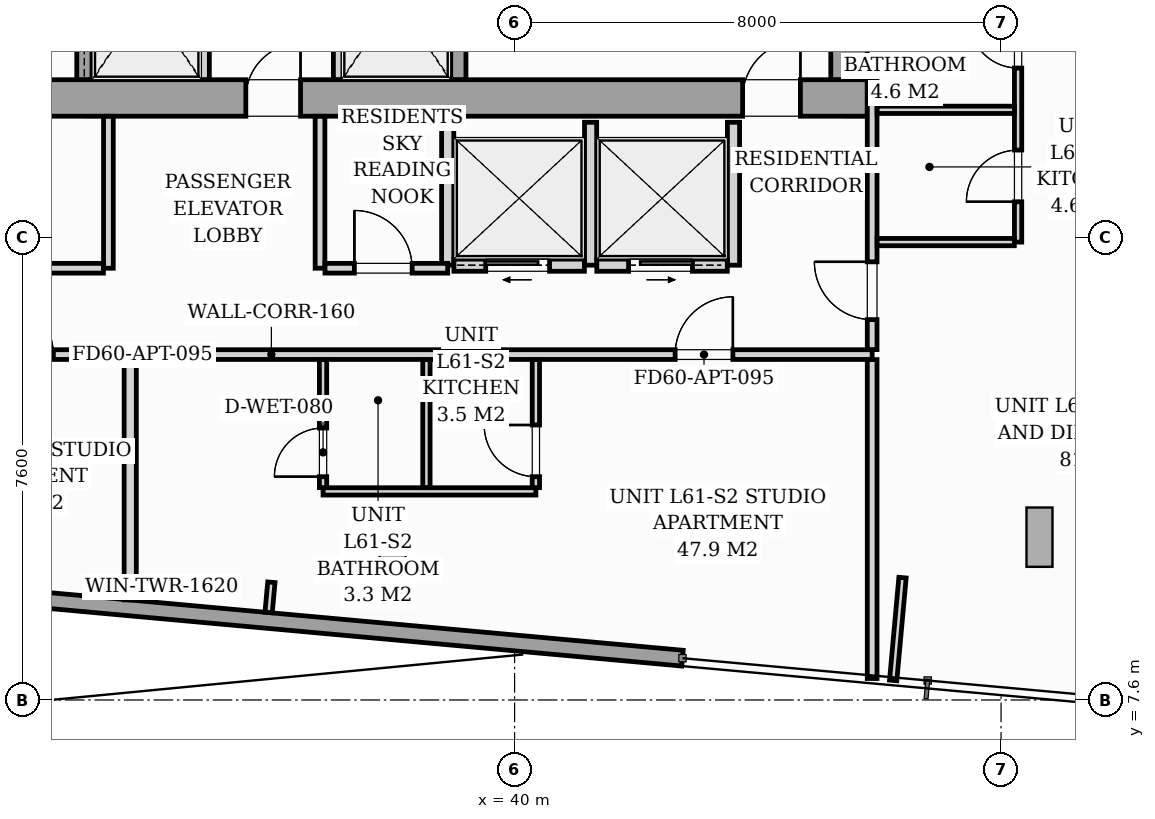
"""IFC4 building model, lengths in metres.
Left out: names, types, materials, properties, quantities, classifications, styles, units other than length and angle.
Written with IfcOpenShell. Run it as: python <this file> out.ifc"""

import sys

from ifc_helpers import new_model, si_unit, direction, frame, frame_2d, origin, origin_2d, place, context, subcontext, project, spatial, rectangle, i_section, extrude, source, transform, mapped, element, fill, save


model = new_model("IFC4")
c1 = context("Model", 3, precision=1e-05, world=origin(), true_north=direction((0.0, 1.0)))
c2 = subcontext(c1, "Body", "Model", "MODEL_VIEW")
j1 = project(units=[si_unit("LENGTHUNIT", "METRE"), si_unit("PLANEANGLEUNIT", "RADIAN")], contexts=[c1])
p1 = place(None, origin())
s1 = spatial("IfcSite", under=j1, at=p1, CompositionType="ELEMENT")
p2 = place(p1, origin())
s2 = spatial("IfcBuilding", under=s1, at=p2, CompositionType="ELEMENT")
p3 = place(p2, frame((0.0, 0.0, 211.4)))
s3 = spatial("IfcBuildingStorey", under=s2, at=p3, CompositionType="ELEMENT", Elevation=211.4)
m1 = source(origin(), c2, "Body", "SweptSolid", [
    extrude(i_section(OverallWidth=0.409, OverallDepth=0.425, WebThickness=0.033, FlangeThickness=0.052, FilletRadius=0.018, at=origin_2d()), origin(), (0.0, 0.0, 1.0), 5.196),
])
for number, where, z_axis, x_axis in (
    (1, (33.12, 17.4, 0.002), (0.0, 0.0, 1.0), (1.0, 0.0, 0.0)),
    (2, (38.88, 17.4, 0.002), (0.0, 0.0, 1.0), (1.0, 0.0, 0.0)),
    (3, (45.6, 17.4, 0.002), (0.0, 0.0, 1.0), (1.0, 0.0, 0.0)),
):
    element("IfcColumn", number, at=place(p3, frame(where, z_axis=z_axis, x_axis=x_axis)), inside=s3, PredefinedType="PILASTER", context=c2, shape_type="MappedRepresentation", body=[
        mapped(m1, transform((0.0, 0.0, 0.0), scale=1.0)),
    ])
m2 = source(origin(), c2, "Body", "SweptSolid", [
    extrude(i_section(OverallWidth=0.427, OverallDepth=0.976, WebThickness=0.031, FlangeThickness=0.056, FilletRadius=0.024, at=origin_2d()), origin(), (0.0, 0.0, 1.0), 8.487),
])
p4 = place(p3, frame((39.648, 9.549, 0.195), z_axis=(-0.85149277394, 0.086009371105, 0.51726438502), x_axis=(0.514645573214, -0.051984401335, 0.855825657473)))
e4 = element("IfcColumn", 4, at=p4, inside=s3, PredefinedType="COLUMN", context=c2, shape_type="MappedRepresentation", body=[
    mapped(m2, transform((0.0, 0.0, 0.0), scale=1.0)),
])
m3 = source(origin(), c2, "Body", "SweptSolid", [
    extrude(i_section(OverallWidth=0.427, OverallDepth=0.976, WebThickness=0.031, FlangeThickness=0.056, FilletRadius=0.024, at=origin_2d()), origin(), (0.0, 0.0, 1.0), 9.321),
])
p5 = place(p3, frame((50.494, 10.518, 0.201), z_axis=(-0.87551198847, -0.113200790205, 0.46974923006), x_axis=(0.465871238968, 0.060235602801, 0.882799898538)))
e5 = element("IfcColumn", 5, at=p5, inside=s3, PredefinedType="COLUMN", context=c2, shape_type="MappedRepresentation", body=[
    mapped(m3, transform((0.0, 0.0, 0.0), scale=1.0)),
])
p6 = place(p3, frame((42.761, 8.287, 0.0), z_axis=(0.0, 0.0, 1.0), x_axis=(-0.995884956798, 0.090626446601, 0.0)))
e6 = element("IfcWall", 6, at=p6, inside=s3, PredefinedType="STANDARD", context=c2, shape_type="SweptSolid", body=[
    extrude(rectangle(XDim=21.6, YDim=0.26, at=frame_2d((10.8, 0.0))), origin(), (0.0, 0.0, 1.0), 4.78),
])
p7 = place(p6, frame((12.194, 0.0, 0.75)))
e7 = element("IfcOpeningElement", 7, at=p7, cuts=e6, PredefinedType="OPENING", context=c2, shape_type="SweptSolid", body=[
    extrude(rectangle(XDim=1.6, YDim=1.5, at=frame_2d((0.8, 0.75))), frame((0.0, 0.14, 0.0), z_axis=(0.0, -1.0, 0.0), x_axis=(1.0, 0.0, 0.0)), (0.0, 0.0, 1.0), 0.28),
])
p8 = place(p3, frame((26.2, 17.5, 0.0), z_axis=(0.0, 0.0, 1.0), x_axis=(1.0, 0.0, 0.0)))
e8 = element("IfcWall", 8, at=p8, inside=s3, PredefinedType="SHEAR", context=c2, shape_type="SweptSolid", body=[
    extrude(rectangle(XDim=19.6, YDim=0.6, at=frame_2d((9.8, 0.0))), origin(), (0.0, 0.0, 1.0), 5.2),
])
p9 = place(p8, frame((0.95, 0.0, 0.0)))
e9 = element("IfcOpeningElement", 9, at=p9, cuts=e8, PredefinedType="OPENING", context=c2, shape_type="SweptSolid", body=[
    extrude(rectangle(XDim=0.95, YDim=2.06, at=frame_2d((0.475, 1.03))), frame((0.0, 0.31, 0.0), z_axis=(0.0, -1.0, 0.0), x_axis=(1.0, 0.0, 0.0)), (0.0, 0.0, 1.0), 0.62),
])
p10 = place(p8, frame((9.38, 0.0, 0.0)))
e10 = element("IfcOpeningElement", 10, at=p10, cuts=e8, PredefinedType="OPENING", context=c2, shape_type="SweptSolid", body=[
    extrude(rectangle(XDim=0.9, YDim=2.06, at=frame_2d((0.45, 1.03))), frame((0.0, 0.31, 0.0), z_axis=(0.0, -1.0, 0.0), x_axis=(1.0, 0.0, 0.0)), (0.0, 0.0, 1.0), 0.62),
])
p11 = place(p8, frame((17.55, 0.0, 0.0)))
e11 = element("IfcOpeningElement", 11, at=p11, cuts=e8, PredefinedType="OPENING", context=c2, shape_type="SweptSolid", body=[
    extrude(rectangle(XDim=0.95, YDim=2.06, at=frame_2d((0.475, 1.03))), frame((0.0, 0.31, 0.0), z_axis=(0.0, -1.0, 0.0), x_axis=(1.0, 0.0, 0.0)), (0.0, 0.0, 1.0), 0.62),
])
p12 = place(p3, frame((45.5, 17.802, 0.0), z_axis=(0.0, 0.0, 1.0), x_axis=(0.0, 1.0, 0.0)))
e12 = element("IfcWall", 12, at=p12, inside=s3, PredefinedType="SHEAR", context=c2, shape_type="SweptSolid", body=[
    extrude(rectangle(XDim=5.796, YDim=0.6, at=frame_2d((2.898, 0.0))), origin(), (0.0, 0.0, 1.0), 5.2),
])
p13 = place(p3, frame((32.925, 17.802, 0.0), z_axis=(0.0, 0.0, 1.0), x_axis=(0.0, 1.0, 0.0)))
e13 = element("IfcWall", 13, at=p13, inside=s3, PredefinedType="SOLIDWALL", context=c2, shape_type="SweptSolid", body=[
    extrude(rectangle(XDim=2.646, YDim=0.25, at=frame_2d((1.323, 0.0))), origin(), (0.0, 0.0, 1.0), 5.2),
])
p14 = place(p13, frame((0.548, 0.0, 0.0)))
e14 = element("IfcOpeningElement", 14, at=p14, cuts=e13, PredefinedType="OPENING", context=c2, shape_type="SweptSolid", body=[
    extrude(rectangle(XDim=1.1, YDim=2.08, at=frame_2d((0.55, 1.04))), frame((0.0, 0.135, 0.0), z_axis=(0.0, -1.0, 0.0), x_axis=(1.0, 0.0, 0.0)), (0.0, 0.0, 1.0), 0.27),
])
for number, where, z_axis, x_axis in (
    (15, (34.9, 17.802, 0.0), (0.0, 0.0, 1.0), (0.0, 1.0, 0.0)),
    (16, (37.1, 17.802, 0.0), (0.0, 0.0, 1.0), (0.0, 1.0, 0.0)),
):
    element("IfcWall", number, at=place(p3, frame(where, z_axis=z_axis, x_axis=x_axis)), inside=s3, PredefinedType="PARTITIONING", context=c2, shape_type="SweptSolid", body=[
        extrude(rectangle(XDim=2.646, YDim=0.16, at=frame_2d((1.323, 0.0))), origin(), (0.0, 0.0, 1.0), 4.78),
    ])
p15 = place(p3, frame((39.075, 17.802, 0.0), z_axis=(0.0, 0.0, 1.0), x_axis=(0.0, 1.0, 0.0)))
e17 = element("IfcWall", 17, at=p15, inside=s3, PredefinedType="SOLIDWALL", context=c2, shape_type="SweptSolid", body=[
    extrude(rectangle(XDim=2.646, YDim=0.25, at=frame_2d((1.323, 0.0))), origin(), (0.0, 0.0, 1.0), 5.2),
])
p16 = place(p15, frame((0.548, 0.0, 0.0)))
e18 = element("IfcOpeningElement", 18, at=p16, cuts=e17, PredefinedType="OPENING", context=c2, shape_type="SweptSolid", body=[
    extrude(rectangle(XDim=1.1, YDim=2.08, at=frame_2d((0.55, 1.04))), frame((0.0, 0.135, 0.0), z_axis=(0.0, -1.0, 0.0), x_axis=(1.0, 0.0, 0.0)), (0.0, 0.0, 1.0), 0.27),
])
for number, where, z_axis, x_axis in (
    (19, (38.9, 14.75, 0.0), (0.0, 0.0, 1.0), (0.0, 1.0, 0.0)),
    (20, (41.25, 14.75, 0.0), (0.0, 0.0, 1.0), (0.0, 1.0, 0.0)),
    (21, (43.6, 14.75, 0.0), (0.0, 0.0, 1.0), (0.0, 1.0, 0.0)),
):
    element("IfcWall", number, at=place(p3, frame(where, z_axis=z_axis, x_axis=x_axis)), inside=s3, PredefinedType="PARTITIONING", context=c2, shape_type="SweptSolid", body=[
        extrude(rectangle(XDim=2.35, YDim=0.2, at=frame_2d((1.175, 0.0))), origin(), (0.0, 0.0, 1.0), 4.78),
    ])
p17 = place(p3, frame((39.002, 14.75, 0.0), z_axis=(0.0, 0.0, 1.0), x_axis=(1.0, 0.0, 0.0)))
e22 = element("IfcWall", 22, at=p17, inside=s3, PredefinedType="PARTITIONING", context=c2, shape_type="SweptSolid", body=[
    extrude(rectangle(XDim=2.146, YDim=0.2, at=frame_2d((1.073, 0.0))), origin(), (0.0, 0.0, 1.0), 4.78),
])
p18 = place(p17, frame((0.523, 0.0, 0.0)))
e23 = element("IfcOpeningElement", 23, at=p18, cuts=e22, PredefinedType="OPENING", context=c2, shape_type="SweptSolid", body=[
    extrude(rectangle(XDim=1.05, YDim=2.08, at=frame_2d((0.525, 1.04))), frame((0.0, 0.11, 0.0), z_axis=(0.0, -1.0, 0.0), x_axis=(1.0, 0.0, 0.0)), (0.0, 0.0, 1.0), 0.22),
])
p19 = place(p3, frame((41.352, 14.75, 0.0), z_axis=(0.0, 0.0, 1.0), x_axis=(1.0, 0.0, 0.0)))
e24 = element("IfcWall", 24, at=p19, inside=s3, PredefinedType="PARTITIONING", context=c2, shape_type="SweptSolid", body=[
    extrude(rectangle(XDim=2.146, YDim=0.2, at=frame_2d((1.073, 0.0))), origin(), (0.0, 0.0, 1.0), 4.78),
])
p20 = place(p19, frame((0.523, 0.0, 0.0)))
e25 = element("IfcOpeningElement", 25, at=p20, cuts=e24, PredefinedType="OPENING", context=c2, shape_type="SweptSolid", body=[
    extrude(rectangle(XDim=1.05, YDim=2.08, at=frame_2d((0.525, 1.04))), frame((0.0, 0.11, 0.0), z_axis=(0.0, -1.0, 0.0), x_axis=(1.0, 0.0, 0.0)), (0.0, 0.0, 1.0), 0.22),
])
p21 = place(p3, frame((26.12, 13.28, 0.0), z_axis=(0.0, 0.0, 1.0), x_axis=(1.0, 0.0, 0.0)))
e26 = element("IfcWall", 26, at=p21, inside=s3, PredefinedType="PARTITIONING", context=c2, shape_type="SweptSolid", body=[
    extrude(rectangle(XDim=19.76, YDim=0.16, at=frame_2d((9.88, 0.0))), origin(), (0.0, 0.0, 1.0), 4.345),
])
p22 = place(p21, frame((5.345, 0.0, 0.0)))
e27 = element("IfcOpeningElement", 27, at=p22, cuts=e26, PredefinedType="OPENING", context=c2, shape_type="SweptSolid", body=[
    extrude(rectangle(XDim=0.95, YDim=2.06, at=frame_2d((0.475, 1.03))), frame((0.0, 0.09, 0.0), z_axis=(0.0, -1.0, 0.0), x_axis=(1.0, 0.0, 0.0)), (0.0, 0.0, 1.0), 0.18),
])
p23 = place(p21, frame((16.52, 0.0, 0.0)))
e28 = element("IfcOpeningElement", 28, at=p23, cuts=e26, PredefinedType="OPENING", context=c2, shape_type="SweptSolid", body=[
    extrude(rectangle(XDim=0.95, YDim=2.06, at=frame_2d((0.475, 1.03))), frame((0.0, 0.09, 0.0), z_axis=(0.0, -1.0, 0.0), x_axis=(1.0, 0.0, 0.0)), (0.0, 0.0, 1.0), 0.18),
])
p24 = place(p3, frame((45.88, 7.953, 0.0), z_axis=(0.0, 0.0, 1.0), x_axis=(0.0, 1.0, 0.0)))
e29 = element("IfcWall", 29, at=p24, inside=s3, PredefinedType="PARTITIONING", context=c2, shape_type="SweptSolid", body=[
    extrude(rectangle(XDim=5.245, YDim=0.16, at=frame_2d((2.623, 0.0))), origin(), (0.0, 0.0, 1.0), 4.78),
])
p25 = place(p3, frame((45.88, 13.362, 0.0), z_axis=(0.0, 0.0, 1.0), x_axis=(0.0, 1.0, 0.0)))
e30 = element("IfcWall", 30, at=p25, inside=s3, PredefinedType="PARTITIONING", context=c2, shape_type="SweptSolid", body=[
    extrude(rectangle(XDim=4.44, YDim=0.16, at=frame_2d((2.22, 0.0))), origin(), (0.0, 0.0, 1.0), 4.78),
])
p26 = place(p25, frame((0.493, 0.0, 0.0)))
e31 = element("IfcOpeningElement", 31, at=p26, cuts=e30, PredefinedType="OPENING", context=c2, shape_type="SweptSolid", body=[
    extrude(rectangle(XDim=0.95, YDim=2.06, at=frame_2d((0.475, 1.03))), frame((0.0, 0.09, 0.0), z_axis=(0.0, -1.0, 0.0), x_axis=(1.0, 0.0, 0.0)), (0.0, 0.0, 1.0), 0.18),
])
p27 = place(p3, frame((33.679, 9.246, 0.0), z_axis=(0.0, 0.0, 1.0), x_axis=(0.0, 1.0, 0.0)))
e32 = element("IfcWall", 32, at=p27, inside=s3, PredefinedType="PARTITIONING", context=c2, shape_type="SweptSolid", body=[
    extrude(rectangle(XDim=3.952, YDim=0.2, at=frame_2d((1.976, 0.0))), origin(), (0.0, 0.0, 1.0), 4.78),
])
p28 = place(p3, frame((36.85, 11.03, 0.0), z_axis=(0.0, 0.0, 1.0), x_axis=(1.0, 0.0, 0.0)))
e33 = element("IfcWall", 33, at=p28, inside=s3, PredefinedType="PARTITIONING", context=c2, shape_type="SweptSolid", body=[
    extrude(rectangle(XDim=3.5, YDim=0.12, at=frame_2d((1.75, 0.0))), origin(), (0.0, 0.0, 1.0), 4.78),
])
p29 = place(p3, frame((36.85, 11.092, 0.0), z_axis=(0.0, 0.0, 1.0), x_axis=(0.0, 1.0, 0.0)))
e34 = element("IfcWall", 34, at=p29, inside=s3, PredefinedType="PARTITIONING", context=c2, shape_type="SweptSolid", body=[
    extrude(rectangle(XDim=2.106, YDim=0.12, at=frame_2d((1.053, 0.0))), origin(), (0.0, 0.0, 1.0), 4.78),
])
p30 = place(p29, frame((0.18, 0.0, 0.0)))
e35 = element("IfcOpeningElement", 35, at=p30, cuts=e34, PredefinedType="OPENING", context=c2, shape_type="SweptSolid", body=[
    extrude(rectangle(XDim=0.8, YDim=2.02, at=frame_2d((0.4, 1.01))), frame((0.0, 0.07, 0.0), z_axis=(0.0, -1.0, 0.0), x_axis=(1.0, 0.0, 0.0)), (0.0, 0.0, 1.0), 0.14),
])
p31 = place(p3, frame((38.55, 11.092, 0.0), z_axis=(0.0, 0.0, 1.0), x_axis=(0.0, 1.0, 0.0)))
e36 = element("IfcWall", 36, at=p31, inside=s3, PredefinedType="PARTITIONING", context=c2, shape_type="SweptSolid", body=[
    extrude(rectangle(XDim=2.106, YDim=0.12, at=frame_2d((1.053, 0.0))), origin(), (0.0, 0.0, 1.0), 4.78),
])
p32 = place(p3, frame((40.35, 11.092, 0.0), z_axis=(0.0, 0.0, 1.0), x_axis=(0.0, 1.0, 0.0)))
e37 = element("IfcWall", 37, at=p32, inside=s3, PredefinedType="PARTITIONING", context=c2, shape_type="SweptSolid", body=[
    extrude(rectangle(XDim=2.106, YDim=0.12, at=frame_2d((1.053, 0.0))), origin(), (0.0, 0.0, 1.0), 4.78),
])
p33 = place(p32, frame((0.18, 0.0, 0.0)))
e38 = element("IfcOpeningElement", 38, at=p33, cuts=e37, PredefinedType="OPENING", context=c2, shape_type="SweptSolid", body=[
    extrude(rectangle(XDim=0.85, YDim=2.05, at=frame_2d((0.425, 1.025))), frame((0.0, 0.07, 0.0), z_axis=(0.0, -1.0, 0.0), x_axis=(1.0, 0.0, 0.0)), (0.0, 0.0, 1.0), 0.14),
])
p34 = place(p3, frame((48.28, 15.13, 0.0), z_axis=(0.0, 0.0, 1.0), x_axis=(0.0, 1.0, 0.0)))
e39 = element("IfcWall", 39, at=p34, inside=s3, PredefinedType="PARTITIONING", context=c2, shape_type="SweptSolid", body=[
    extrude(rectangle(XDim=4.35, YDim=0.12, at=frame_2d((2.175, 0.0))), origin(), (0.0, 0.0, 1.0), 4.78),
])
p35 = place(p34, frame((0.663, 0.0, 0.0)))
e40 = element("IfcOpeningElement", 40, at=p35, cuts=e39, PredefinedType="OPENING", context=c2, shape_type="SweptSolid", body=[
    extrude(rectangle(XDim=0.85, YDim=2.05, at=frame_2d((0.425, 1.025))), frame((0.0, 0.07, 0.0), z_axis=(0.0, -1.0, 0.0), x_axis=(1.0, 0.0, 0.0)), (0.0, 0.0, 1.0), 0.14),
])
p36 = place(p34, frame((2.862, 0.0, 0.0)))
e41 = element("IfcOpeningElement", 41, at=p36, cuts=e39, PredefinedType="OPENING", context=c2, shape_type="SweptSolid", body=[
    extrude(rectangle(XDim=0.8, YDim=2.02, at=frame_2d((0.4, 1.01))), frame((0.0, 0.07, 0.0), z_axis=(0.0, -1.0, 0.0), x_axis=(1.0, 0.0, 0.0)), (0.0, 0.0, 1.0), 0.14),
])
p37 = place(p3, frame((45.962, 17.305, 0.0), z_axis=(0.0, 0.0, 1.0), x_axis=(1.0, 0.0, 0.0)))
e42 = element("IfcWall", 42, at=p37, inside=s3, PredefinedType="PARTITIONING", context=c2, shape_type="SweptSolid", body=[
    extrude(rectangle(XDim=2.256, YDim=0.12, at=frame_2d((1.128, 0.0))), origin(), (0.0, 0.0, 1.0), 4.122),
])
p38 = place(p3, frame((45.962, 15.13, 0.0), z_axis=(0.0, 0.0, 1.0), x_axis=(1.0, 0.0, 0.0)))
e43 = element("IfcWall", 43, at=p38, inside=s3, PredefinedType="PARTITIONING", context=c2, shape_type="SweptSolid", body=[
    extrude(rectangle(XDim=2.256, YDim=0.12, at=frame_2d((1.128, 0.0))), origin(), (0.0, 0.0, 1.0), 4.78),
])
p39 = place(p3, frame((33.32, 14.7, 0.0), z_axis=(0.0, 0.0, 1.0), x_axis=(0.0, 1.0, 0.0)))
e44 = element("IfcWall", 44, at=p39, inside=s3, PredefinedType="PARTITIONING", context=c2, shape_type="SweptSolid", body=[
    extrude(rectangle(XDim=2.498, YDim=0.16, at=frame_2d((1.249, 0.0))), origin(), (0.0, 0.0, 1.0), 4.78),
])
p40 = place(p3, frame((28.442, 14.7, 0.0), z_axis=(0.0, 0.0, 1.0), x_axis=(1.0, 0.0, 0.0)))
e45 = element("IfcWall", 45, at=p40, inside=s3, PredefinedType="PARTITIONING", context=c2, shape_type="SweptSolid", body=[
    extrude(rectangle(XDim=4.796, YDim=0.16, at=frame_2d((2.398, 0.0))), origin(), (0.0, 0.0, 1.0), 4.345),
])
p41 = place(p40, frame((1.948, 0.0, 0.0)))
e46 = element("IfcOpeningElement", 46, at=p41, cuts=e45, PredefinedType="OPENING", context=c2, shape_type="SweptSolid", body=[
    extrude(rectangle(XDim=0.9, YDim=2.05, at=frame_2d((0.45, 1.025))), frame((0.0, 0.09, 0.0), z_axis=(0.0, -1.0, 0.0), x_axis=(1.0, 0.0, 0.0)), (0.0, 0.0, 1.0), 0.18),
])
p42 = place(p3, frame((36.8, 14.7, 0.0), z_axis=(0.0, 0.0, 1.0), x_axis=(0.0, 1.0, 0.0)))
e47 = element("IfcWall", 47, at=p42, inside=s3, PredefinedType="PARTITIONING", context=c2, shape_type="SweptSolid", body=[
    extrude(rectangle(XDim=2.498, YDim=0.16, at=frame_2d((1.249, 0.0))), origin(), (0.0, 0.0, 1.0), 4.78),
])
p43 = place(p3, frame((36.882, 14.7, 0.0), z_axis=(0.0, 0.0, 1.0), x_axis=(1.0, 0.0, 0.0)))
e48 = element("IfcWall", 48, at=p43, inside=s3, PredefinedType="PARTITIONING", context=c2, shape_type="SweptSolid", body=[
    extrude(rectangle(XDim=2.018, YDim=0.16, at=frame_2d((1.009, 0.0))), origin(), (0.0, 0.0, 1.0), 4.78),
])
p44 = place(p43, frame((0.483, 0.0, 0.0)))
e49 = element("IfcOpeningElement", 49, at=p44, cuts=e48, PredefinedType="OPENING", context=c2, shape_type="SweptSolid", body=[
    extrude(rectangle(XDim=0.95, YDim=2.06, at=frame_2d((0.475, 1.03))), frame((0.0, 0.09, 0.0), z_axis=(0.0, -1.0, 0.0), x_axis=(1.0, 0.0, 0.0)), (0.0, 0.0, 1.0), 0.18),
])
p45 = place(p3, frame((36.0, 9.536, 0.0), z_axis=(0.0, 0.0, 1.0), x_axis=(-0.090579892113, -0.995889192202, 0.0)))
e50 = element("IfcWall", 50, at=p45, inside=s3, PredefinedType="PARTITIONING", context=c2, shape_type="SweptSolid", body=[
    extrude(rectangle(XDim=0.499, YDim=0.12, at=frame_2d((0.249, 0.0))), origin(), (0.0, 0.0, 1.0), 4.78),
])
p46 = place(p3, frame((46.379, 9.612, 0.0), z_axis=(0.0, 0.0, 1.0), x_axis=(-0.090613556002, -0.99588612977, 0.0)))
e51 = element("IfcWall", 51, at=p46, inside=s3, PredefinedType="PARTITIONING", context=c2, shape_type="SweptSolid", body=[
    extrude(rectangle(XDim=1.698, YDim=0.12, at=frame_2d((0.849, 0.0))), origin(), (0.0, 0.0, 1.0), 4.78),
])
m4 = source(origin(), c2, "Body", "SweptSolid", [
    extrude(rectangle(XDim=0.9, YDim=2.06, at=frame_2d((0.45, 1.03))), frame((0.0, 0.025, 0.0), z_axis=(0.0, -1.0, 0.0), x_axis=(1.0, 0.0, 0.0)), (0.0, 0.0, 1.0), 0.05),
])
p47 = place(p10, origin())
e52 = element("IfcDoor", 52, at=p47, inside=s3, OperationType="SINGLE_SWING_RIGHT", PredefinedType="DOOR", context=c2, shape_type="MappedRepresentation", body=[
    mapped(m4, transform((0.0, 0.0, 0.0), scale=1.0)),
])
fill(e10, e52)
m5 = source(origin(), c2, "Body", "SweptSolid", [
    extrude(rectangle(XDim=0.95, YDim=2.06, at=frame_2d((0.475, 1.03))), frame((0.0, 0.025, 0.0), z_axis=(0.0, -1.0, 0.0), x_axis=(1.0, 0.0, 0.0)), (0.0, 0.0, 1.0), 0.05),
])
p48 = place(p11, origin())
e53 = element("IfcDoor", 53, at=p48, inside=s3, OperationType="SINGLE_SWING_RIGHT", PredefinedType="DOOR", context=c2, shape_type="MappedRepresentation", body=[
    mapped(m5, transform((0.0, 0.0, 0.0), scale=1.0)),
])
fill(e11, e53)
m6 = source(origin(), c2, "Body", "SweptSolid", [
    extrude(rectangle(XDim=1.05, YDim=2.08, at=frame_2d((0.525, 1.04))), frame((0.0, 0.025, 0.0), z_axis=(0.0, -1.0, 0.0), x_axis=(1.0, 0.0, 0.0)), (0.0, 0.0, 1.0), 0.05),
])
p49 = place(p18, origin())
e54 = element("IfcDoor", 54, at=p49, inside=s3, OperationType="SLIDING_TO_LEFT", PredefinedType="DOOR", context=c2, shape_type="MappedRepresentation", body=[
    mapped(m6, transform((0.0, 0.0, 0.0), scale=1.0)),
])
fill(e23, e54)
p50 = place(p20, origin())
e55 = element("IfcDoor", 55, at=p50, inside=s3, OperationType="SLIDING_TO_RIGHT", PredefinedType="DOOR", context=c2, shape_type="MappedRepresentation", body=[
    mapped(m6, transform((0.0, 0.0, 0.0), scale=1.0)),
])
fill(e25, e55)
m7 = source(origin(), c2, "Body", "SweptSolid", [
    extrude(rectangle(XDim=0.95, YDim=2.06, at=frame_2d((0.475, 1.03))), frame((0.0, 0.025, 0.0), z_axis=(0.0, -1.0, 0.0), x_axis=(1.0, 0.0, 0.0)), (0.0, 0.0, 1.0), 0.05),
])
p51 = place(p22, origin())
e56 = element("IfcDoor", 56, at=p51, inside=s3, OperationType="SINGLE_SWING_LEFT", PredefinedType="DOOR", context=c2, shape_type="MappedRepresentation", body=[
    mapped(m7, transform((0.0, 0.0, 0.0), scale=1.0)),
])
fill(e27, e56)
p52 = place(p23, origin())
e57 = element("IfcDoor", 57, at=p52, inside=s3, OperationType="SINGLE_SWING_RIGHT", PredefinedType="DOOR", context=c2, shape_type="MappedRepresentation", body=[
    mapped(m7, transform((0.0, 0.0, 0.0), scale=1.0)),
])
fill(e28, e57)
m8 = source(origin(), c2, "Body", "SweptSolid", [
    extrude(rectangle(XDim=0.8, YDim=2.02, at=frame_2d((0.4, 1.01))), frame((0.0, 0.025, 0.0), z_axis=(0.0, -1.0, 0.0), x_axis=(1.0, 0.0, 0.0)), (0.0, 0.0, 1.0), 0.05),
])
p53 = place(p30, origin())
e58 = element("IfcDoor", 58, at=p53, inside=s3, OperationType="SINGLE_SWING_LEFT", PredefinedType="DOOR", context=c2, shape_type="MappedRepresentation", body=[
    mapped(m8, transform((0.0, 0.0, 0.0), scale=1.0)),
])
fill(e35, e58)
m9 = source(origin(), c2, "Body", "SweptSolid", [
    extrude(rectangle(XDim=0.85, YDim=2.05, at=frame_2d((0.425, 1.025))), frame((0.0, 0.025, 0.0), z_axis=(0.0, -1.0, 0.0), x_axis=(1.0, 0.0, 0.0)), (0.0, 0.0, 1.0), 0.05),
])
p54 = place(p33, origin())
e59 = element("IfcDoor", 59, at=p54, inside=s3, OperationType="SINGLE_SWING_RIGHT", PredefinedType="DOOR", context=c2, shape_type="MappedRepresentation", body=[
    mapped(m9, transform((0.0, 0.0, 0.0), scale=1.0)),
])
fill(e38, e59)
p55 = place(p26, origin())
e60 = element("IfcDoor", 60, at=p55, inside=s3, OperationType="SINGLE_SWING_RIGHT", PredefinedType="DOOR", context=c2, shape_type="MappedRepresentation", body=[
    mapped(m7, transform((0.0, 0.0, 0.0), scale=1.0)),
])
fill(e31, e60)
p56 = place(p35, origin())
e61 = element("IfcDoor", 61, at=p56, inside=s3, OperationType="SINGLE_SWING_LEFT", PredefinedType="DOOR", context=c2, shape_type="MappedRepresentation", body=[
    mapped(m9, transform((0.0, 0.0, 0.0), scale=1.0)),
])
fill(e40, e61)
p57 = place(p36, origin())
e62 = element("IfcDoor", 62, at=p57, inside=s3, OperationType="SINGLE_SWING_RIGHT", PredefinedType="DOOR", context=c2, shape_type="MappedRepresentation", body=[
    mapped(m8, transform((0.0, 0.0, 0.0), scale=1.0)),
])
fill(e41, e62)
p58 = place(p44, origin())
e63 = element("IfcDoor", 63, at=p58, inside=s3, OperationType="SINGLE_SWING_LEFT", PredefinedType="DOOR", context=c2, shape_type="MappedRepresentation", body=[
    mapped(m7, transform((0.0, 0.0, 0.0), scale=1.0)),
])
fill(e49, e63)
save(model, sys.argv[1])
